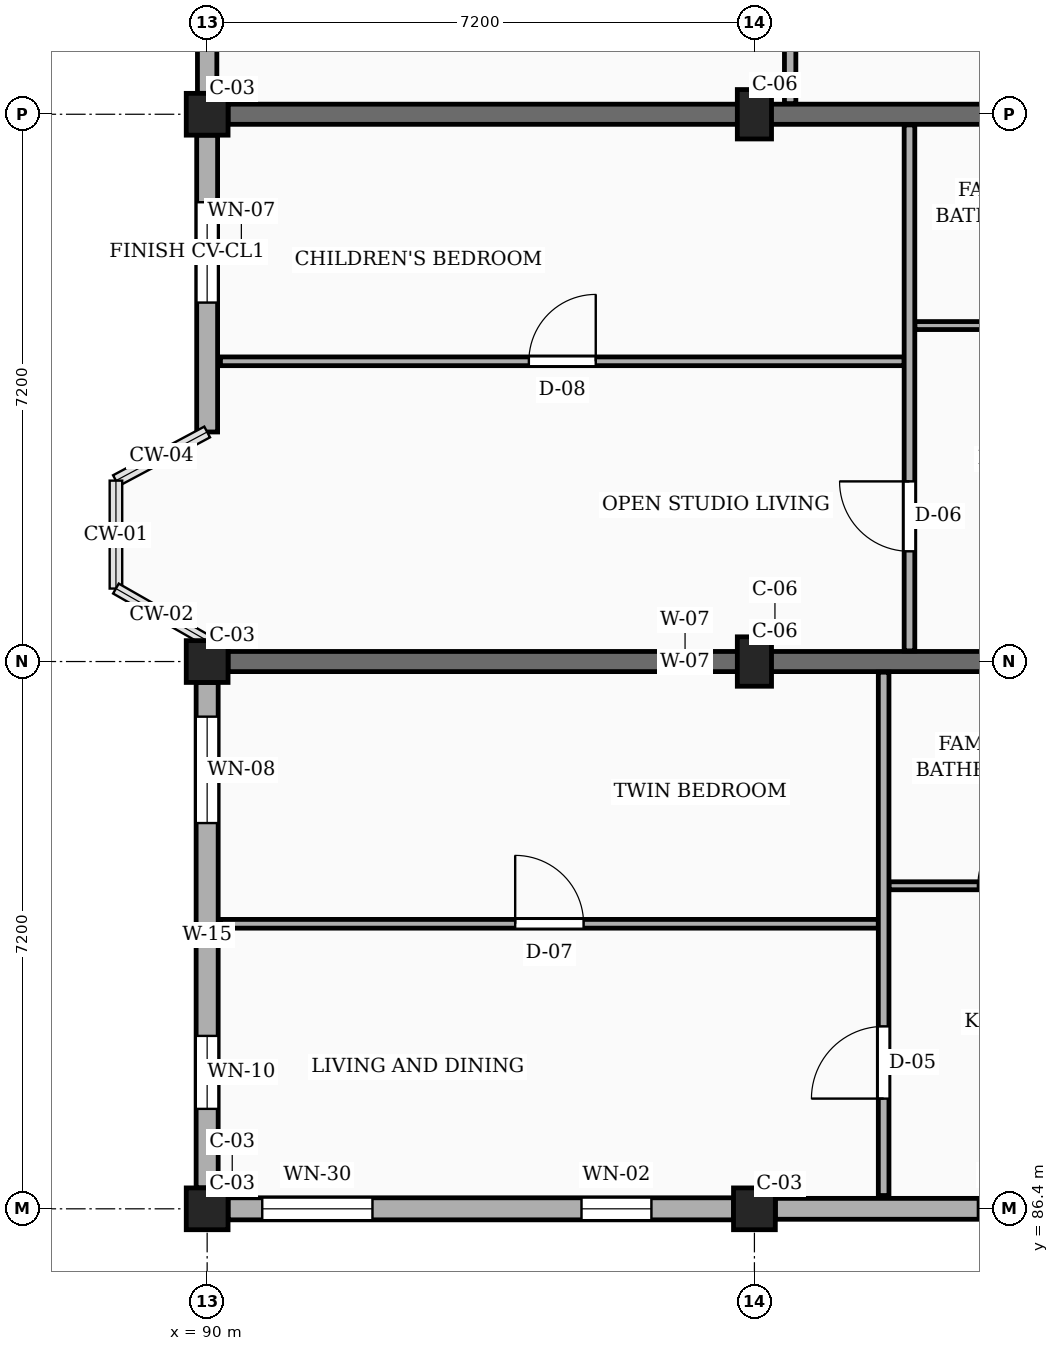
"""IFC4 building model, lengths in metres.
Left out: names, types, materials, properties, quantities, classifications, styles, units other than length and angle.
Written with IfcOpenShell. Run it as: python <this file> out.ifc"""

import sys

from ifc_helpers import new_model, si_unit, direction, frame, frame_2d, origin, origin_2d, place, context, subcontext, project, spatial, rectangle, extrude, element, fill, save


model = new_model("IFC4")
c1 = context("Model", 3, precision=1e-05, world=origin(), true_north=direction((0.0, 1.0)))
c2 = subcontext(c1, "Body", "Model", "MODEL_VIEW")
j1 = project(units=[si_unit("LENGTHUNIT", "METRE"), si_unit("PLANEANGLEUNIT", "RADIAN")], contexts=[c1])
p1 = place(None, origin())
s1 = spatial("IfcSite", under=j1, at=p1, CompositionType="ELEMENT")
p2 = place(p1, origin())
s2 = spatial("IfcBuilding", under=s1, at=p2, CompositionType="ELEMENT")
p3 = place(p2, frame((0.0, 0.0, 10.8)))
s3 = spatial("IfcBuildingStorey", under=s2, at=p3, CompositionType="ELEMENT", Elevation=10.8)
for number, where, z_axis, x_axis in (
    (1, (90.0, 86.4, 0.0), (0.0, 0.0, 1.0), (1.0, 0.0, 0.0)),
    (2, (90.0, 93.6, 0.0), (0.0, 0.0, 1.0), (1.0, 0.0, 0.0)),
    (3, (90.0, 100.8, 0.0), (0.0, 0.0, 1.0), (1.0, 0.0, 0.0)),
    (4, (97.2, 86.4, 0.0), (0.0, 0.0, 1.0), (1.0, 0.0, 0.0)),
):
    element("IfcColumn", number, at=place(p3, frame(where, z_axis=z_axis, x_axis=x_axis)), inside=s3, PredefinedType="COLUMN", context=c2, shape_type="SweptSolid", body=[
        extrude(rectangle(XDim=0.55, YDim=0.55, at=origin_2d()), origin(), (0.0, 0.0, 1.0), 3.15),
    ])
for number, where, z_axis, x_axis in (
    (5, (97.2, 93.6, 0.0), (0.0, 0.0, 1.0), (1.0, 0.0, 0.0)),
    (6, (97.2, 100.8, 0.0), (0.0, 0.0, 1.0), (1.0, 0.0, 0.0)),
):
    element("IfcColumn", number, at=place(p3, frame(where, z_axis=z_axis, x_axis=x_axis)), inside=s3, PredefinedType="COLUMN", context=c2, shape_type="SweptSolid", body=[
        extrude(rectangle(XDim=0.45, YDim=0.65, at=origin_2d()), origin(), (0.0, 0.0, 1.0), 3.15),
    ])
for number, where, z_axis, x_axis in (
    (7, (90.275, 93.6, 0.0), (0.0, 0.0, 1.0), (1.0, 0.0, 0.0)),
    (8, (90.275, 100.8, 0.0), (0.0, 0.0, 1.0), (1.0, 0.0, 0.0)),
):
    element("IfcWall", number, at=place(p3, frame(where, z_axis=z_axis, x_axis=x_axis)), inside=s3, PredefinedType="SOLIDWALL", context=c2, shape_type="SweptSolid", body=[
        extrude(rectangle(XDim=12.025, YDim=0.265, at=frame_2d((6.013, 0.0))), origin(), (0.0, 0.0, 1.0), 2.19),
    ])
p4 = place(p3, frame((90.275, 86.4, 0.0), z_axis=(0.0, 0.0, 1.0), x_axis=(1.0, 0.0, 0.0)))
e9 = element("IfcWall", 9, at=p4, inside=s3, PredefinedType="SOLIDWALL", context=c2, shape_type="SweptSolid", body=[
    extrude(rectangle(XDim=6.65, YDim=0.29, at=frame_2d((3.325, 0.0))), origin(), (0.0, 0.0, 1.0), 2.46),
])
p5 = place(p4, frame((0.45, 0.0, 0.78)))
e10 = element("IfcOpeningElement", 10, at=p5, cuts=e9, PredefinedType="OPENING", context=c2, shape_type="SweptSolid", body=[
    extrude(rectangle(XDim=1.45, YDim=1.44, at=frame_2d((0.725, 0.72))), frame((0.0, 0.155, 0.0), z_axis=(0.0, -1.0, 0.0), x_axis=(1.0, 0.0, 0.0)), (0.0, 0.0, 1.0), 0.31),
])
p6 = place(p4, frame((4.65, 0.0, 0.78)))
e11 = element("IfcOpeningElement", 11, at=p6, cuts=e9, PredefinedType="OPENING", context=c2, shape_type="SweptSolid", body=[
    extrude(rectangle(XDim=0.92, YDim=1.15, at=frame_2d((0.46, 0.575))), frame((0.0, 0.155, 0.0), z_axis=(0.0, -1.0, 0.0), x_axis=(1.0, 0.0, 0.0)), (0.0, 0.0, 1.0), 0.31),
])
p7 = place(p3, frame((97.475, 86.4, 0.0), z_axis=(0.0, 0.0, 1.0), x_axis=(1.0, 0.0, 0.0)))
e12 = element("IfcWall", 12, at=p7, inside=s3, PredefinedType="SOLIDWALL", context=c2, shape_type="SweptSolid", body=[
    extrude(rectangle(XDim=6.65, YDim=0.275, at=frame_2d((3.325, 0.0))), origin(), (0.0, 0.0, 1.0), 2.46),
])
p8 = place(p7, frame((2.665, 0.0, 0.78)))
e13 = element("IfcOpeningElement", 13, at=p8, cuts=e12, PredefinedType="OPENING", context=c2, shape_type="SweptSolid", body=[
    extrude(rectangle(XDim=0.92, YDim=1.15, at=frame_2d((0.46, 0.575))), frame((0.0, 0.147, 0.0), z_axis=(0.0, -1.0, 0.0), x_axis=(1.0, 0.0, 0.0)), (0.0, 0.0, 1.0), 0.295),
])
p9 = place(p7, frame((5.127, 0.0, 0.78)))
e14 = element("IfcOpeningElement", 14, at=p9, cuts=e12, PredefinedType="OPENING", context=c2, shape_type="SweptSolid", body=[
    extrude(rectangle(XDim=1.08, YDim=1.15, at=frame_2d((0.54, 0.575))), frame((0.0, 0.147, 0.0), z_axis=(0.0, -1.0, 0.0), x_axis=(1.0, 0.0, 0.0)), (0.0, 0.0, 1.0), 0.295),
])
p10 = place(p3, frame((90.0, 107.725, 0.0), z_axis=(0.0, 0.0, 1.0), x_axis=(0.0, -1.0, 0.0)))
e15 = element("IfcWall", 15, at=p10, inside=s3, PredefinedType="SOLIDWALL", context=c2, shape_type="SweptSolid", body=[
    extrude(rectangle(XDim=6.65, YDim=0.255, at=frame_2d((3.325, 0.0))), origin(), (0.0, 0.0, 1.0), 2.46),
])
p11 = place(p10, frame((0.45, 0.0, 0.78)))
e16 = element("IfcOpeningElement", 16, at=p11, cuts=e15, PredefinedType="OPENING", context=c2, shape_type="SweptSolid", body=[
    extrude(rectangle(XDim=1.16, YDim=1.15, at=frame_2d((0.58, 0.575))), frame((0.0, 0.137, 0.0), z_axis=(0.0, -1.0, 0.0), x_axis=(1.0, 0.0, 0.0)), (0.0, 0.0, 1.0), 0.275),
])
p12 = place(p10, frame((4.65, 0.0, 0.78)))
e17 = element("IfcOpeningElement", 17, at=p12, cuts=e15, PredefinedType="OPENING", context=c2, shape_type="SweptSolid", body=[
    extrude(rectangle(XDim=1.32, YDim=1.15, at=frame_2d((0.66, 0.575))), frame((0.0, 0.137, 0.0), z_axis=(0.0, -1.0, 0.0), x_axis=(1.0, 0.0, 0.0)), (0.0, 0.0, 1.0), 0.275),
])
p13 = place(p3, frame((90.0, 100.525, 0.0), z_axis=(0.0, 0.0, 1.0), x_axis=(0.0, -1.0, 0.0)))
e18 = element("IfcWall", 18, at=p13, inside=s3, PredefinedType="SOLIDWALL", context=c2, shape_type="SweptSolid", body=[
    extrude(rectangle(XDim=3.905, YDim=0.275, at=frame_2d((1.952, 0.0))), origin(), (0.0, 0.0, 1.0), 2.46),
])
p14 = place(p13, frame((0.883, 0.0, 0.78)))
e19 = element("IfcOpeningElement", 19, at=p14, cuts=e18, PredefinedType="OPENING", context=c2, shape_type="SweptSolid", body=[
    extrude(rectangle(XDim=1.32, YDim=1.15, at=frame_2d((0.66, 0.575))), frame((0.0, 0.147, 0.0), z_axis=(0.0, -1.0, 0.0), x_axis=(1.0, 0.0, 0.0)), (0.0, 0.0, 1.0), 0.295),
])
p15 = place(p3, frame((90.0, 93.325, 0.0), z_axis=(0.0, 0.0, 1.0), x_axis=(0.0, -1.0, 0.0)))
e20 = element("IfcWall", 20, at=p15, inside=s3, PredefinedType="SOLIDWALL", context=c2, shape_type="SweptSolid", body=[
    extrude(rectangle(XDim=6.65, YDim=0.29, at=frame_2d((3.325, 0.0))), origin(), (0.0, 0.0, 1.0), 2.46),
])
p16 = place(p15, frame((0.45, 0.0, 0.78)))
e21 = element("IfcOpeningElement", 21, at=p16, cuts=e20, PredefinedType="OPENING", context=c2, shape_type="SweptSolid", body=[
    extrude(rectangle(XDim=1.4, YDim=1.15, at=frame_2d((0.7, 0.575))), frame((0.0, 0.155, 0.0), z_axis=(0.0, -1.0, 0.0), x_axis=(1.0, 0.0, 0.0)), (0.0, 0.0, 1.0), 0.31),
])
p17 = place(p15, frame((4.65, 0.0, 0.78)))
e22 = element("IfcOpeningElement", 22, at=p17, cuts=e20, PredefinedType="OPENING", context=c2, shape_type="SweptSolid", body=[
    extrude(rectangle(XDim=0.96, YDim=1.26, at=frame_2d((0.48, 0.63))), frame((0.0, 0.155, 0.0), z_axis=(0.0, -1.0, 0.0), x_axis=(1.0, 0.0, 0.0)), (0.0, 0.0, 1.0), 0.31),
])
p18 = place(p3, frame((90.175, 90.15, 0.0), z_axis=(0.0, 0.0, 1.0), x_axis=(1.0, 0.0, 0.0)))
e23 = element("IfcWall", 23, at=p18, inside=s3, PredefinedType="PARTITIONING", context=c2, shape_type="SweptSolid", body=[
    extrude(rectangle(XDim=8.655, YDim=0.115, at=frame_2d((4.328, 0.0))), origin(), (0.0, 0.0, 1.0), 2.325),
])
p19 = place(p18, frame((3.877, 0.0, 0.0)))
e24 = element("IfcOpeningElement", 24, at=p19, cuts=e23, PredefinedType="OPENING", context=c2, shape_type="SweptSolid", body=[
    extrude(rectangle(XDim=0.9, YDim=2.1, at=frame_2d((0.45, 1.05))), frame((0.0, 0.067, 0.0), z_axis=(0.0, -1.0, 0.0), x_axis=(1.0, 0.0, 0.0)), (0.0, 0.0, 1.0), 0.135),
])
p20 = place(p3, frame((98.97, 90.65, 0.0), z_axis=(0.0, 0.0, 1.0), x_axis=(1.0, 0.0, 0.0)))
e25 = element("IfcWall", 25, at=p20, inside=s3, PredefinedType="PARTITIONING", context=c2, shape_type="SweptSolid", body=[
    extrude(rectangle(XDim=3.24, YDim=0.105, at=frame_2d((1.62, 0.0))), origin(), (0.0, 0.0, 1.0), 2.325),
])
p21 = place(p20, frame((1.17, 0.0, 0.0)))
e26 = element("IfcOpeningElement", 26, at=p21, cuts=e25, PredefinedType="OPENING", context=c2, shape_type="SweptSolid", body=[
    extrude(rectangle(XDim=0.9, YDim=2.05, at=frame_2d((0.45, 1.025))), frame((0.0, 0.062, 0.0), z_axis=(0.0, -1.0, 0.0), x_axis=(1.0, 0.0, 0.0)), (0.0, 0.0, 1.0), 0.125),
])
p22 = place(p3, frame((98.9, 86.575, 0.0), z_axis=(0.0, 0.0, 1.0), x_axis=(0.0, 1.0, 0.0)))
e27 = element("IfcWall", 27, at=p22, inside=s3, PredefinedType="PARTITIONING", context=c2, shape_type="SweptSolid", body=[
    extrude(rectangle(XDim=6.885, YDim=0.14, at=frame_2d((3.442, 0.0))), origin(), (0.0, 0.0, 1.0), 2.325),
])
p23 = place(p22, frame((1.275, 0.0, 0.0)))
e28 = element("IfcOpeningElement", 28, at=p23, cuts=e27, PredefinedType="OPENING", context=c2, shape_type="SweptSolid", body=[
    extrude(rectangle(XDim=0.95, YDim=2.1, at=frame_2d((0.475, 1.05))), frame((0.0, 0.08, 0.0), z_axis=(0.0, -1.0, 0.0), x_axis=(1.0, 0.0, 0.0)), (0.0, 0.0, 1.0), 0.16),
])
p24 = place(p3, frame((90.175, 97.55, 0.0), z_axis=(0.0, 0.0, 1.0), x_axis=(1.0, 0.0, 0.0)))
e29 = element("IfcWall", 29, at=p24, inside=s3, PredefinedType="PARTITIONING", context=c2, shape_type="SweptSolid", body=[
    extrude(rectangle(XDim=8.995, YDim=0.115, at=frame_2d((4.498, 0.0))), origin(), (0.0, 0.0, 1.0), 2.325),
])
p25 = place(p24, frame((4.058, 0.0, 0.0)))
e30 = element("IfcOpeningElement", 30, at=p25, cuts=e29, PredefinedType="OPENING", context=c2, shape_type="SweptSolid", body=[
    extrude(rectangle(XDim=0.88, YDim=2.08, at=frame_2d((0.44, 1.04))), frame((0.0, 0.067, 0.0), z_axis=(0.0, -1.0, 0.0), x_axis=(1.0, 0.0, 0.0)), (0.0, 0.0, 1.0), 0.135),
])
p26 = place(p3, frame((99.31, 98.02, 0.0), z_axis=(0.0, 0.0, 1.0), x_axis=(1.0, 0.0, 0.0)))
e31 = element("IfcWall", 31, at=p26, inside=s3, PredefinedType="PARTITIONING", context=c2, shape_type="SweptSolid", body=[
    extrude(rectangle(XDim=2.9, YDim=0.105, at=frame_2d((1.45, 0.0))), origin(), (0.0, 0.0, 1.0), 2.325),
])
p27 = place(p26, frame((1.015, 0.0, 0.0)))
e32 = element("IfcOpeningElement", 32, at=p27, cuts=e31, PredefinedType="OPENING", context=c2, shape_type="SweptSolid", body=[
    extrude(rectangle(XDim=0.87, YDim=2.05, at=frame_2d((0.435, 1.025))), frame((0.0, 0.062, 0.0), z_axis=(0.0, -1.0, 0.0), x_axis=(1.0, 0.0, 0.0)), (0.0, 0.0, 1.0), 0.125),
])
p28 = place(p3, frame((99.24, 93.74, 0.0), z_axis=(0.0, 0.0, 1.0), x_axis=(0.0, 1.0, 0.0)))
e33 = element("IfcWall", 33, at=p28, inside=s3, PredefinedType="PARTITIONING", context=c2, shape_type="SweptSolid", body=[
    extrude(rectangle(XDim=6.92, YDim=0.14, at=frame_2d((3.46, 0.0))), origin(), (0.0, 0.0, 1.0), 2.325),
])
p29 = place(p28, frame((1.31, 0.0, 0.0)))
e34 = element("IfcOpeningElement", 34, at=p29, cuts=e33, PredefinedType="OPENING", context=c2, shape_type="SweptSolid", body=[
    extrude(rectangle(XDim=0.92, YDim=2.1, at=frame_2d((0.46, 1.05))), frame((0.0, 0.08, 0.0), z_axis=(0.0, -1.0, 0.0), x_axis=(1.0, 0.0, 0.0)), (0.0, 0.0, 1.0), 0.16),
])
p30 = place(p3, frame((97.67, 100.94, 0.0), z_axis=(0.0, 0.0, 1.0), x_axis=(0.0, 1.0, 0.0)))
e35 = element("IfcWall", 35, at=p30, inside=s3, PredefinedType="PARTITIONING", context=c2, shape_type="SweptSolid", body=[
    extrude(rectangle(XDim=6.92, YDim=0.15, at=frame_2d((3.46, 0.0))), origin(), (0.0, 0.0, 1.0), 2.325),
])
p31 = place(p30, frame((4.66, 0.0, 0.0)))
e36 = element("IfcOpeningElement", 36, at=p31, cuts=e35, PredefinedType="OPENING", context=c2, shape_type="SweptSolid", body=[
    extrude(rectangle(XDim=0.95, YDim=2.1, at=frame_2d((0.475, 1.05))), frame((0.0, 0.085, 0.0), z_axis=(0.0, -1.0, 0.0), x_axis=(1.0, 0.0, 0.0)), (0.0, 0.0, 1.0), 0.17),
])
p32 = place(p5, origin())
e37 = element("IfcWindow", 37, at=p32, inside=s3, PartitioningType="SINGLE_PANEL", PredefinedType="WINDOW", context=c2, shape_type="SweptSolid", body=[
    extrude(rectangle(XDim=1.45, YDim=1.44, at=frame_2d((0.725, 0.72))), frame((0.0, 0.03, 0.0), z_axis=(0.0, -1.0, 0.0), x_axis=(1.0, 0.0, 0.0)), (0.0, 0.0, 1.0), 0.06),
])
fill(e10, e37)
p33 = place(p6, origin())
e38 = element("IfcWindow", 38, at=p33, inside=s3, PartitioningType="SINGLE_PANEL", PredefinedType="WINDOW", context=c2, shape_type="SweptSolid", body=[
    extrude(rectangle(XDim=0.92, YDim=1.15, at=frame_2d((0.46, 0.575))), frame((0.0, 0.03, 0.0), z_axis=(0.0, -1.0, 0.0), x_axis=(1.0, 0.0, 0.0)), (0.0, 0.0, 1.0), 0.06),
])
fill(e11, e38)
p34 = place(p8, origin())
e39 = element("IfcWindow", 39, at=p34, inside=s3, PartitioningType="SINGLE_PANEL", PredefinedType="WINDOW", context=c2, shape_type="SweptSolid", body=[
    extrude(rectangle(XDim=0.92, YDim=1.15, at=frame_2d((0.46, 0.575))), frame((0.0, 0.03, 0.0), z_axis=(0.0, -1.0, 0.0), x_axis=(1.0, 0.0, 0.0)), (0.0, 0.0, 1.0), 0.06),
])
fill(e13, e39)
p35 = place(p14, origin())
e40 = element("IfcWindow", 40, at=p35, inside=s3, PartitioningType="SINGLE_PANEL", PredefinedType="WINDOW", context=c2, shape_type="SweptSolid", body=[
    extrude(rectangle(XDim=1.32, YDim=1.15, at=frame_2d((0.66, 0.575))), frame((0.0, 0.03, 0.0), z_axis=(0.0, -1.0, 0.0), x_axis=(1.0, 0.0, 0.0)), (0.0, 0.0, 1.0), 0.06),
])
fill(e19, e40)
p36 = place(p16, origin())
e41 = element("IfcWindow", 41, at=p36, inside=s3, PartitioningType="SINGLE_PANEL", PredefinedType="WINDOW", context=c2, shape_type="SweptSolid", body=[
    extrude(rectangle(XDim=1.4, YDim=1.15, at=frame_2d((0.7, 0.575))), frame((0.0, 0.03, 0.0), z_axis=(0.0, -1.0, 0.0), x_axis=(1.0, 0.0, 0.0)), (0.0, 0.0, 1.0), 0.06),
])
fill(e21, e41)
p37 = place(p17, origin())
e42 = element("IfcWindow", 42, at=p37, inside=s3, PartitioningType="SINGLE_PANEL", PredefinedType="WINDOW", context=c2, shape_type="SweptSolid", body=[
    extrude(rectangle(XDim=0.96, YDim=1.26, at=frame_2d((0.48, 0.63))), frame((0.0, 0.03, 0.0), z_axis=(0.0, -1.0, 0.0), x_axis=(1.0, 0.0, 0.0)), (0.0, 0.0, 1.0), 0.06),
])
fill(e22, e42)
p38 = place(p19, origin())
e43 = element("IfcDoor", 43, at=p38, inside=s3, OperationType="SINGLE_SWING_LEFT", PredefinedType="DOOR", context=c2, shape_type="SweptSolid", body=[
    extrude(rectangle(XDim=0.9, YDim=2.1, at=frame_2d((0.45, 1.05))), frame((0.0, 0.025, 0.0), z_axis=(0.0, -1.0, 0.0), x_axis=(1.0, 0.0, 0.0)), (0.0, 0.0, 1.0), 0.05),
])
fill(e24, e43)
p39 = place(p21, origin())
e44 = element("IfcDoor", 44, at=p39, inside=s3, OperationType="SINGLE_SWING_RIGHT", PredefinedType="DOOR", context=c2, shape_type="SweptSolid", body=[
    extrude(rectangle(XDim=0.9, YDim=2.05, at=frame_2d((0.45, 1.025))), frame((0.0, 0.025, 0.0), z_axis=(0.0, -1.0, 0.0), x_axis=(1.0, 0.0, 0.0)), (0.0, 0.0, 1.0), 0.05),
])
fill(e26, e44)
p40 = place(p23, origin())
e45 = element("IfcDoor", 45, at=p40, inside=s3, OperationType="SINGLE_SWING_LEFT", PredefinedType="DOOR", context=c2, shape_type="SweptSolid", body=[
    extrude(rectangle(XDim=0.95, YDim=2.1, at=frame_2d((0.475, 1.05))), frame((0.0, 0.025, 0.0), z_axis=(0.0, -1.0, 0.0), x_axis=(1.0, 0.0, 0.0)), (0.0, 0.0, 1.0), 0.05),
])
fill(e28, e45)
p41 = place(p25, origin())
e46 = element("IfcDoor", 46, at=p41, inside=s3, OperationType="SINGLE_SWING_RIGHT", PredefinedType="DOOR", context=c2, shape_type="SweptSolid", body=[
    extrude(rectangle(XDim=0.88, YDim=2.08, at=frame_2d((0.44, 1.04))), frame((0.0, 0.025, 0.0), z_axis=(0.0, -1.0, 0.0), x_axis=(1.0, 0.0, 0.0)), (0.0, 0.0, 1.0), 0.05),
])
fill(e30, e46)
p42 = place(p29, origin())
e47 = element("IfcDoor", 47, at=p42, inside=s3, OperationType="SINGLE_SWING_RIGHT", PredefinedType="DOOR", context=c2, shape_type="SweptSolid", body=[
    extrude(rectangle(XDim=0.92, YDim=2.1, at=frame_2d((0.46, 1.05))), frame((0.0, 0.025, 0.0), z_axis=(0.0, -1.0, 0.0), x_axis=(1.0, 0.0, 0.0)), (0.0, 0.0, 1.0), 0.05),
])
fill(e34, e47)
save(model, sys.argv[1])
